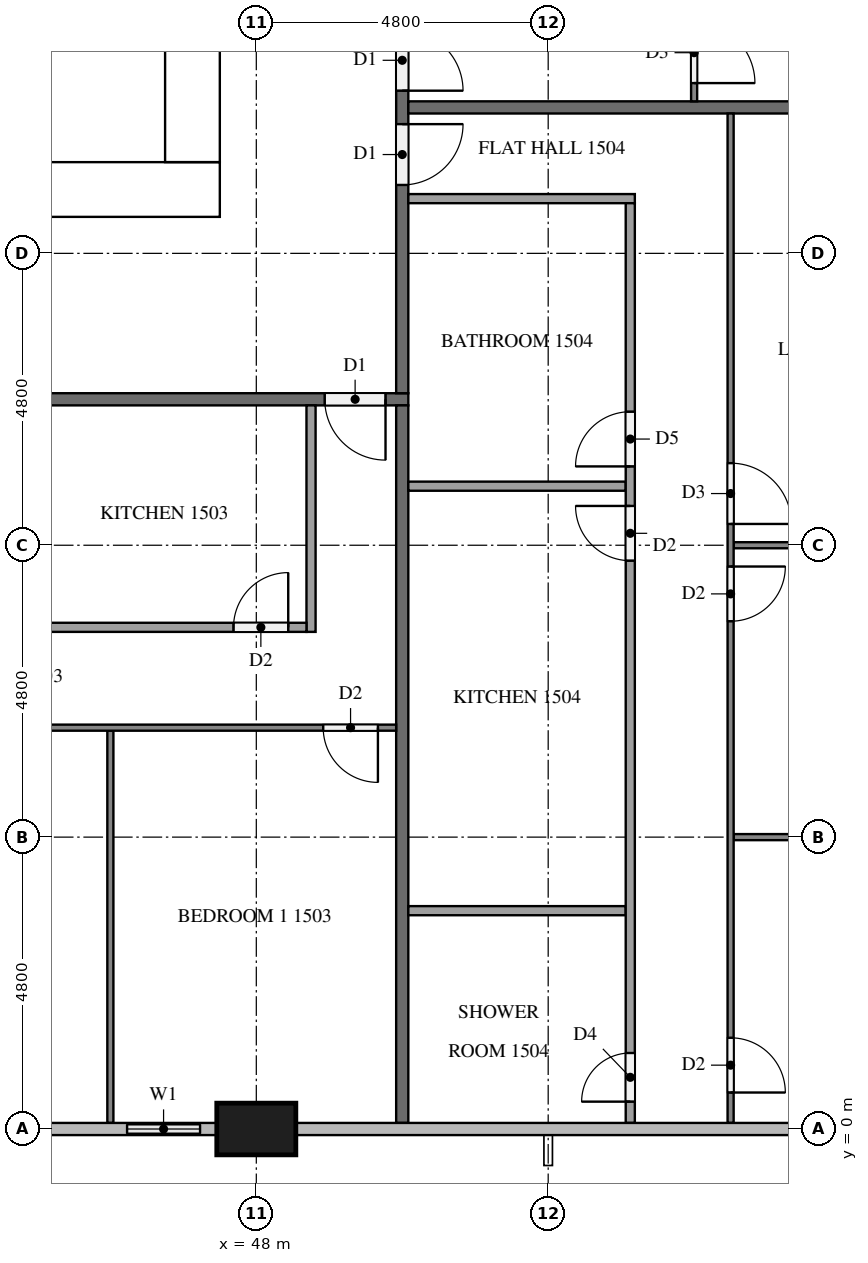
"""IFC4 building model, lengths in metres.
Left out: names, types, materials, properties, quantities, classifications, styles, units other than length and angle.
Written with IfcOpenShell. Run it as: python <this file> out.ifc"""

import sys

from ifc_helpers import new_model, si_unit, direction, frame, frame_2d, origin, origin_2d, place, context, subcontext, project, spatial, rectangle, extrude, element, fill, save


model = new_model("IFC4")
c1 = context("Model", 3, precision=1e-05, world=origin(), true_north=direction((0.0, 1.0)))
c2 = subcontext(c1, "Body", "Model", "MODEL_VIEW")
j1 = project(units=[si_unit("LENGTHUNIT", "METRE"), si_unit("PLANEANGLEUNIT", "RADIAN")], contexts=[c1])
p1 = place(None, origin())
s1 = spatial("IfcSite", under=j1, at=p1, CompositionType="ELEMENT")
p2 = place(p1, origin())
s2 = spatial("IfcBuilding", under=s1, at=p2, CompositionType="ELEMENT")
p3 = place(p2, frame((0.0, 0.0, 62.8)))
s3 = spatial("IfcBuildingStorey", under=s2, at=p3, CompositionType="ELEMENT", Elevation=62.8)
p4 = place(p3, frame((15.0, 15.45, 0.0), z_axis=(0.0, 0.0, 1.0), x_axis=(1.0, 0.0, 0.0)))
e1 = element("IfcWall", 1, at=p4, inside=s3, PredefinedType="SHEAR", context=c2, shape_type="SweptSolid", body=[
    extrude(rectangle(XDim=32.4, YDim=0.9, at=frame_2d((16.2, 0.0))), origin(), (0.0, 0.0, 1.0), 3.2),
])
p5 = place(p4, frame((15.3, 0.0, 0.0)))
e2 = element("IfcOpeningElement", 2, at=p5, cuts=e1, PredefinedType="OPENING", context=c2, shape_type="SweptSolid", body=[
    extrude(rectangle(XDim=1.8, YDim=2.1, at=frame_2d((0.9, 1.05))), frame((0.0, 0.46, 0.0), z_axis=(0.0, -1.0, 0.0), x_axis=(1.0, 0.0, 0.0)), (0.0, 0.0, 1.0), 0.92),
])
p6 = place(p3, frame((46.95, 15.9, 0.0), z_axis=(0.0, 0.0, 1.0), x_axis=(0.0, 1.0, 0.0)))
e3 = element("IfcWall", 3, at=p6, inside=s3, PredefinedType="SHEAR", context=c2, shape_type="SweptSolid", body=[
    extrude(rectangle(XDim=21.0, YDim=0.9, at=frame_2d((10.5, 0.0))), origin(), (0.0, 0.0, 1.0), 3.2),
])
p7 = place(p6, frame((10.2, 0.0, 0.0)))
e4 = element("IfcOpeningElement", 4, at=p7, cuts=e3, PredefinedType="OPENING", context=c2, shape_type="SweptSolid", body=[
    extrude(rectangle(XDim=1.2, YDim=2.1, at=frame_2d((0.6, 1.05))), frame((0.0, 0.46, 0.0), z_axis=(0.0, -1.0, 0.0), x_axis=(1.0, 0.0, 0.0)), (0.0, 0.0, 1.0), 0.92),
])
p8 = place(p3, frame((48.0, 0.0, 0.0), z_axis=(0.0, 0.0, 1.0), x_axis=(1.0, 0.0, 0.0)))
e5 = element("IfcColumn", 5, at=p8, inside=s3, PredefinedType="COLUMN", context=c2, shape_type="SweptSolid", body=[
    extrude(rectangle(XDim=1.3, YDim=0.85, at=origin_2d()), origin(), (0.0, 0.0, 1.0), 3.2),
])
p9 = place(p3, frame((45.6, 0.0, 0.0), z_axis=(0.0, 0.0, 1.0), x_axis=(1.0, 0.0, 0.0)))
e6 = element("IfcWall", 6, at=p9, inside=s3, PredefinedType="SOLIDWALL", context=c2, shape_type="SweptSolid", body=[
    extrude(rectangle(XDim=1.75, YDim=0.15, at=frame_2d((0.875, 0.0))), origin(), (0.0, 0.0, 1.0), 3.2),
])
p10 = place(p9, frame((0.275, 0.0, 0.9)))
e7 = element("IfcOpeningElement", 7, at=p10, cuts=e6, PredefinedType="OPENING", context=c2, shape_type="SweptSolid", body=[
    extrude(rectangle(XDim=1.2, YDim=1.4, at=frame_2d((0.6, 0.7))), frame((0.0, 0.085, 0.0), z_axis=(0.0, -1.0, 0.0), x_axis=(1.0, 0.0, 0.0)), (0.0, 0.0, 1.0), 0.17),
])
p11 = place(p3, frame((50.5, 12.0, 0.0), z_axis=(0.0, 0.0, 1.0), x_axis=(-1.0, 0.0, 0.0)))
e8 = element("IfcWall", 8, at=p11, inside=s3, PredefinedType="PARTITIONING", context=c2, shape_type="SweptSolid", body=[
    extrude(rectangle(XDim=38.6, YDim=0.2, at=frame_2d((19.3, 0.0))), origin(), (0.0, 0.0, 1.0), 3.2),
])
p12 = place(p11, frame((37.225, 0.0, 0.0)))
e9 = element("IfcOpeningElement", 9, at=p12, cuts=e8, PredefinedType="OPENING", context=c2, shape_type="SweptSolid", body=[
    extrude(rectangle(XDim=1.0, YDim=2.1, at=frame_2d((0.5, 1.05))), frame((0.0, 0.11, 0.0), z_axis=(0.0, -1.0, 0.0), x_axis=(1.0, 0.0, 0.0)), (0.0, 0.0, 1.0), 0.22),
])
p13 = place(p11, frame((22.825, 0.0, 0.0)))
e10 = element("IfcOpeningElement", 10, at=p13, cuts=e8, PredefinedType="OPENING", context=c2, shape_type="SweptSolid", body=[
    extrude(rectangle(XDim=1.0, YDim=2.1, at=frame_2d((0.5, 1.05))), frame((0.0, 0.11, 0.0), z_axis=(0.0, -1.0, 0.0), x_axis=(1.0, 0.0, 0.0)), (0.0, 0.0, 1.0), 0.22),
])
p14 = place(p11, frame((0.375, 0.0, 0.0)))
e11 = element("IfcOpeningElement", 11, at=p14, cuts=e8, PredefinedType="OPENING", context=c2, shape_type="SweptSolid", body=[
    extrude(rectangle(XDim=1.0, YDim=2.1, at=frame_2d((0.5, 1.05))), frame((0.0, 0.11, 0.0), z_axis=(0.0, -1.0, 0.0), x_axis=(1.0, 0.0, 0.0)), (0.0, 0.0, 1.0), 0.22),
])
p15 = place(p3, frame((50.4, 40.7, 0.0), z_axis=(0.0, 0.0, 1.0), x_axis=(0.0, -1.0, 0.0)))
e12 = element("IfcWall", 12, at=p15, inside=s3, PredefinedType="PARTITIONING", context=c2, shape_type="SweptSolid", body=[
    extrude(rectangle(XDim=28.6, YDim=0.2, at=frame_2d((14.3, 0.0))), origin(), (0.0, 0.0, 1.0), 3.2),
])
p16 = place(p15, frame((24.175, 0.0, 0.0)))
e13 = element("IfcOpeningElement", 13, at=p16, cuts=e12, PredefinedType="OPENING", context=c2, shape_type="SweptSolid", body=[
    extrude(rectangle(XDim=1.0, YDim=2.1, at=frame_2d((0.5, 1.05))), frame((0.0, 0.11, 0.0), z_axis=(0.0, -1.0, 0.0), x_axis=(1.0, 0.0, 0.0)), (0.0, 0.0, 1.0), 0.22),
])
p17 = place(p15, frame((22.625, 0.0, 0.0)))
e14 = element("IfcOpeningElement", 14, at=p17, cuts=e12, PredefinedType="OPENING", context=c2, shape_type="SweptSolid", body=[
    extrude(rectangle(XDim=1.0, YDim=2.1, at=frame_2d((0.5, 1.05))), frame((0.0, 0.11, 0.0), z_axis=(0.0, -1.0, 0.0), x_axis=(1.0, 0.0, 0.0)), (0.0, 0.0, 1.0), 0.22),
])
p18 = place(p15, frame((10.625, 0.0, 0.0)))
e15 = element("IfcOpeningElement", 15, at=p18, cuts=e12, PredefinedType="OPENING", context=c2, shape_type="SweptSolid", body=[
    extrude(rectangle(XDim=1.0, YDim=2.1, at=frame_2d((0.5, 1.05))), frame((0.0, 0.11, 0.0), z_axis=(0.0, -1.0, 0.0), x_axis=(1.0, 0.0, 0.0)), (0.0, 0.0, 1.0), 0.22),
])
p19 = place(p3, frame((50.4, 11.9, 0.0), z_axis=(0.0, 0.0, 1.0), x_axis=(0.0, -1.0, 0.0)))
e16 = element("IfcWall", 16, at=p19, inside=s3, PredefinedType="PARTITIONING", context=c2, shape_type="SweptSolid", body=[
    extrude(rectangle(XDim=11.8, YDim=0.2, at=frame_2d((5.9, 0.0))), origin(), (0.0, 0.0, 1.0), 3.2),
])
p20 = place(p3, frame((50.5, 16.8, 0.0), z_axis=(0.0, 0.0, 1.0), x_axis=(1.0, 0.0, 0.0)))
e17 = element("IfcWall", 17, at=p20, inside=s3, PredefinedType="PARTITIONING", context=c2, shape_type="SweptSolid", body=[
    extrude(rectangle(XDim=11.8, YDim=0.2, at=frame_2d((5.9, 0.0))), origin(), (0.0, 0.0, 1.0), 3.2),
])
p21 = place(p3, frame((45.6, 6.55, 0.0), z_axis=(0.0, 0.0, 1.0), x_axis=(0.0, -1.0, 0.0)))
e18 = element("IfcWall", 18, at=p21, inside=s3, PredefinedType="PARTITIONING", context=c2, shape_type="SweptSolid", body=[
    extrude(rectangle(XDim=6.45, YDim=0.1, at=frame_2d((3.225, 0.0))), origin(), (0.0, 0.0, 1.0), 3.2),
])
p22 = place(p3, frame((50.3, 6.6, 0.0), z_axis=(0.0, 0.0, 1.0), x_axis=(-1.0, 0.0, 0.0)))
e19 = element("IfcWall", 19, at=p22, inside=s3, PredefinedType="PARTITIONING", context=c2, shape_type="SweptSolid", body=[
    extrude(rectangle(XDim=9.4, YDim=0.1, at=frame_2d((4.7, 0.0))), origin(), (0.0, 0.0, 1.0), 3.2),
])
p23 = place(p22, frame((0.3, 0.0, 0.0)))
e20 = element("IfcOpeningElement", 20, at=p23, cuts=e19, PredefinedType="OPENING", context=c2, shape_type="SweptSolid", body=[
    extrude(rectangle(XDim=0.9, YDim=2.1, at=frame_2d((0.45, 1.05))), frame((0.0, 0.06, 0.0), z_axis=(0.0, -1.0, 0.0), x_axis=(1.0, 0.0, 0.0)), (0.0, 0.0, 1.0), 0.12),
])
p24 = place(p22, frame((8.1, 0.0, 0.0)))
e21 = element("IfcOpeningElement", 21, at=p24, cuts=e19, PredefinedType="OPENING", context=c2, shape_type="SweptSolid", body=[
    extrude(rectangle(XDim=1.0, YDim=2.1, at=frame_2d((0.5, 1.05))), frame((0.0, 0.06, 0.0), z_axis=(0.0, -1.0, 0.0), x_axis=(1.0, 0.0, 0.0)), (0.0, 0.0, 1.0), 0.12),
])
p25 = place(p3, frame((48.9, 11.9, 0.0), z_axis=(0.0, 0.0, 1.0), x_axis=(0.0, -1.0, 0.0)))
e22 = element("IfcWall", 22, at=p25, inside=s3, PredefinedType="PARTITIONING", context=c2, shape_type="SweptSolid", body=[
    extrude(rectangle(XDim=3.725, YDim=0.15, at=frame_2d((1.862, 0.0))), origin(), (0.0, 0.0, 1.0), 3.2),
])
p26 = place(p3, frame((40.9, 8.25, 0.0), z_axis=(0.0, 0.0, 1.0), x_axis=(1.0, 0.0, 0.0)))
e23 = element("IfcWall", 23, at=p26, inside=s3, PredefinedType="PARTITIONING", context=c2, shape_type="SweptSolid", body=[
    extrude(rectangle(XDim=7.925, YDim=0.15, at=frame_2d((3.962, 0.0))), origin(), (0.0, 0.0, 1.0), 3.2),
])
p27 = place(p26, frame((6.725, 0.0, 0.0)))
e24 = element("IfcOpeningElement", 24, at=p27, cuts=e23, PredefinedType="OPENING", context=c2, shape_type="SweptSolid", body=[
    extrude(rectangle(XDim=0.9, YDim=2.1, at=frame_2d((0.45, 1.05))), frame((0.0, 0.085, 0.0), z_axis=(0.0, -1.0, 0.0), x_axis=(1.0, 0.0, 0.0)), (0.0, 0.0, 1.0), 0.17),
])
p28 = place(p26, frame((0.35, 0.0, 0.0)))
e25 = element("IfcOpeningElement", 25, at=p28, cuts=e23, PredefinedType="OPENING", context=c2, shape_type="SweptSolid", body=[
    extrude(rectangle(XDim=0.8, YDim=2.1, at=frame_2d((0.4, 1.05))), frame((0.0, 0.085, 0.0), z_axis=(0.0, -1.0, 0.0), x_axis=(1.0, 0.0, 0.0)), (0.0, 0.0, 1.0), 0.17),
])
p29 = place(p3, frame((55.85, 9.6, 0.0), z_axis=(0.0, 0.0, 1.0), x_axis=(1.0, 0.0, 0.0)))
e26 = element("IfcWall", 26, at=p29, inside=s3, PredefinedType="PARTITIONING", context=c2, shape_type="SweptSolid", body=[
    extrude(rectangle(XDim=6.45, YDim=0.1, at=frame_2d((3.225, 0.0))), origin(), (0.0, 0.0, 1.0), 3.2),
])
p30 = place(p3, frame((55.85, 4.8, 0.0), z_axis=(0.0, 0.0, 1.0), x_axis=(1.0, 0.0, 0.0)))
e27 = element("IfcWall", 27, at=p30, inside=s3, PredefinedType="PARTITIONING", context=c2, shape_type="SweptSolid", body=[
    extrude(rectangle(XDim=5.975, YDim=0.1, at=frame_2d((2.987, 0.0))), origin(), (0.0, 0.0, 1.0), 3.2),
])
p31 = place(p3, frame((55.8, 16.7, 0.0), z_axis=(0.0, 0.0, 1.0), x_axis=(0.0, -1.0, 0.0)))
e28 = element("IfcWall", 28, at=p31, inside=s3, PredefinedType="PARTITIONING", context=c2, shape_type="SweptSolid", body=[
    extrude(rectangle(XDim=16.6, YDim=0.1, at=frame_2d((8.3, 0.0))), origin(), (0.0, 0.0, 1.0), 3.2),
])
p32 = place(p31, frame((5.75, 0.0, 0.0)))
e29 = element("IfcOpeningElement", 29, at=p32, cuts=e28, PredefinedType="OPENING", context=c2, shape_type="SweptSolid", body=[
    extrude(rectangle(XDim=1.0, YDim=2.1, at=frame_2d((0.5, 1.05))), frame((0.0, 0.06, 0.0), z_axis=(0.0, -1.0, 0.0), x_axis=(1.0, 0.0, 0.0)), (0.0, 0.0, 1.0), 0.12),
])
p33 = place(p31, frame((7.45, 0.0, 0.0)))
e30 = element("IfcOpeningElement", 30, at=p33, cuts=e28, PredefinedType="OPENING", context=c2, shape_type="SweptSolid", body=[
    extrude(rectangle(XDim=0.9, YDim=2.1, at=frame_2d((0.45, 1.05))), frame((0.0, 0.06, 0.0), z_axis=(0.0, -1.0, 0.0), x_axis=(1.0, 0.0, 0.0)), (0.0, 0.0, 1.0), 0.12),
])
p34 = place(p31, frame((15.2, 0.0, 0.0)))
e31 = element("IfcOpeningElement", 31, at=p34, cuts=e28, PredefinedType="OPENING", context=c2, shape_type="SweptSolid", body=[
    extrude(rectangle(XDim=0.9, YDim=2.1, at=frame_2d((0.45, 1.05))), frame((0.0, 0.06, 0.0), z_axis=(0.0, -1.0, 0.0), x_axis=(1.0, 0.0, 0.0)), (0.0, 0.0, 1.0), 0.12),
])
for number, where, z_axis, x_axis in (
    (32, (50.5, 10.571, 0.0), (0.0, 0.0, 1.0), (1.0, 0.0, 0.0)),
    (33, (50.5, 3.59, 0.0), (0.0, 0.0, 1.0), (1.0, 0.0, 0.0)),
):
    element("IfcWall", number, at=place(p3, frame(where, z_axis=z_axis, x_axis=x_axis)), inside=s3, PredefinedType="PARTITIONING", context=c2, shape_type="SweptSolid", body=[
        extrude(rectangle(XDim=3.575, YDim=0.15, at=frame_2d((1.788, 0.0))), origin(), (0.0, 0.0, 1.0), 3.2),
    ])
p35 = place(p3, frame((50.5, 15.3, 0.0), z_axis=(0.0, 0.0, 1.0), x_axis=(1.0, 0.0, 0.0)))
e34 = element("IfcWall", 34, at=p35, inside=s3, PredefinedType="PARTITIONING", context=c2, shape_type="SweptSolid", body=[
    extrude(rectangle(XDim=3.725, YDim=0.15, at=frame_2d((1.863, 0.0))), origin(), (0.0, 0.0, 1.0), 3.2),
])
p36 = place(p3, frame((54.15, 0.1, 0.0), z_axis=(0.0, 0.0, 1.0), x_axis=(0.0, 1.0, 0.0)))
e35 = element("IfcWall", 35, at=p36, inside=s3, PredefinedType="PARTITIONING", context=c2, shape_type="SweptSolid", body=[
    extrude(rectangle(XDim=15.125, YDim=0.15, at=frame_2d((7.562, 0.0))), origin(), (0.0, 0.0, 1.0), 3.2),
])
p37 = place(p36, frame((10.796, 0.0, 0.0)))
e36 = element("IfcOpeningElement", 36, at=p37, cuts=e35, PredefinedType="OPENING", context=c2, shape_type="SweptSolid", body=[
    extrude(rectangle(XDim=0.9, YDim=2.1, at=frame_2d((0.45, 1.05))), frame((0.0, 0.085, 0.0), z_axis=(0.0, -1.0, 0.0), x_axis=(1.0, 0.0, 0.0)), (0.0, 0.0, 1.0), 0.17),
])
p38 = place(p36, frame((9.246, 0.0, 0.0)))
e37 = element("IfcOpeningElement", 37, at=p38, cuts=e35, PredefinedType="OPENING", context=c2, shape_type="SweptSolid", body=[
    extrude(rectangle(XDim=0.9, YDim=2.1, at=frame_2d((0.45, 1.05))), frame((0.0, 0.085, 0.0), z_axis=(0.0, -1.0, 0.0), x_axis=(1.0, 0.0, 0.0)), (0.0, 0.0, 1.0), 0.17),
])
p39 = place(p36, frame((0.35, 0.0, 0.0)))
e38 = element("IfcOpeningElement", 38, at=p39, cuts=e35, PredefinedType="OPENING", context=c2, shape_type="SweptSolid", body=[
    extrude(rectangle(XDim=0.8, YDim=2.1, at=frame_2d((0.4, 1.05))), frame((0.0, 0.085, 0.0), z_axis=(0.0, -1.0, 0.0), x_axis=(1.0, 0.0, 0.0)), (0.0, 0.0, 1.0), 0.17),
])
p40 = place(p3, frame((55.2, 28.7, 0.0), z_axis=(0.0, 0.0, 1.0), x_axis=(0.0, -1.0, 0.0)))
e39 = element("IfcWall", 39, at=p40, inside=s3, PredefinedType="PARTITIONING", context=c2, shape_type="SweptSolid", body=[
    extrude(rectangle(XDim=11.8, YDim=0.1, at=frame_2d((5.9, 0.0))), origin(), (0.0, 0.0, 1.0), 3.2),
])
p41 = place(p40, frame((10.5, 0.0, 0.0)))
e40 = element("IfcOpeningElement", 40, at=p41, cuts=e39, PredefinedType="OPENING", context=c2, shape_type="SweptSolid", body=[
    extrude(rectangle(XDim=1.0, YDim=2.1, at=frame_2d((0.5, 1.05))), frame((0.0, 0.06, 0.0), z_axis=(0.0, -1.0, 0.0), x_axis=(1.0, 0.0, 0.0)), (0.0, 0.0, 1.0), 0.12),
])
p42 = place(p40, frame((0.3, 0.0, 0.0)))
e41 = element("IfcOpeningElement", 41, at=p42, cuts=e39, PredefinedType="OPENING", context=c2, shape_type="SweptSolid", body=[
    extrude(rectangle(XDim=0.9, YDim=2.1, at=frame_2d((0.45, 1.05))), frame((0.0, 0.06, 0.0), z_axis=(0.0, -1.0, 0.0), x_axis=(1.0, 0.0, 0.0)), (0.0, 0.0, 1.0), 0.12),
])
p43 = place(p10, origin())
e42 = element("IfcWindow", 42, at=p43, inside=s3, PartitioningType="SINGLE_PANEL", PredefinedType="WINDOW", context=c2, shape_type="SweptSolid", body=[
    extrude(rectangle(XDim=1.2, YDim=1.4, at=frame_2d((0.6, 0.7))), frame((0.0, 0.03, 0.0), z_axis=(0.0, -1.0, 0.0), x_axis=(1.0, 0.0, 0.0)), (0.0, 0.0, 1.0), 0.06),
])
fill(e7, e42)
p44 = place(p14, origin())
e43 = element("IfcDoor", 43, at=p44, inside=s3, OperationType="SINGLE_SWING_LEFT", PredefinedType="DOOR", context=c2, shape_type="SweptSolid", body=[
    extrude(rectangle(XDim=1.0, YDim=2.1, at=frame_2d((0.5, 1.05))), frame((0.0, 0.025, 0.0), z_axis=(0.0, -1.0, 0.0), x_axis=(1.0, 0.0, 0.0)), (0.0, 0.0, 1.0), 0.05),
])
fill(e11, e43)
p45 = place(p16, origin())
e44 = element("IfcDoor", 44, at=p45, inside=s3, OperationType="SINGLE_SWING_LEFT", PredefinedType="DOOR", context=c2, shape_type="SweptSolid", body=[
    extrude(rectangle(XDim=1.0, YDim=2.1, at=frame_2d((0.5, 1.05))), frame((0.0, 0.025, 0.0), z_axis=(0.0, -1.0, 0.0), x_axis=(1.0, 0.0, 0.0)), (0.0, 0.0, 1.0), 0.05),
])
fill(e13, e44)
p46 = place(p17, origin())
e45 = element("IfcDoor", 45, at=p46, inside=s3, OperationType="SINGLE_SWING_RIGHT", PredefinedType="DOOR", context=c2, shape_type="SweptSolid", body=[
    extrude(rectangle(XDim=1.0, YDim=2.1, at=frame_2d((0.5, 1.05))), frame((0.0, 0.025, 0.0), z_axis=(0.0, -1.0, 0.0), x_axis=(1.0, 0.0, 0.0)), (0.0, 0.0, 1.0), 0.05),
])
fill(e14, e45)
p47 = place(p23, origin())
e46 = element("IfcDoor", 46, at=p47, inside=s3, OperationType="SINGLE_SWING_LEFT", PredefinedType="DOOR", context=c2, shape_type="SweptSolid", body=[
    extrude(rectangle(XDim=0.9, YDim=2.1, at=frame_2d((0.45, 1.05))), frame((0.0, 0.025, 0.0), z_axis=(0.0, -1.0, 0.0), x_axis=(1.0, 0.0, 0.0)), (0.0, 0.0, 1.0), 0.05),
])
fill(e20, e46)
p48 = place(p27, origin())
e47 = element("IfcDoor", 47, at=p48, inside=s3, OperationType="SINGLE_SWING_RIGHT", PredefinedType="DOOR", context=c2, shape_type="SweptSolid", body=[
    extrude(rectangle(XDim=0.9, YDim=2.1, at=frame_2d((0.45, 1.05))), frame((0.0, 0.025, 0.0), z_axis=(0.0, -1.0, 0.0), x_axis=(1.0, 0.0, 0.0)), (0.0, 0.0, 1.0), 0.05),
])
fill(e24, e47)
p49 = place(p32, origin())
e48 = element("IfcDoor", 48, at=p49, inside=s3, OperationType="SINGLE_SWING_RIGHT", PredefinedType="DOOR", context=c2, shape_type="SweptSolid", body=[
    extrude(rectangle(XDim=1.0, YDim=2.1, at=frame_2d((0.5, 1.05))), frame((0.0, 0.025, 0.0), z_axis=(0.0, -1.0, 0.0), x_axis=(1.0, 0.0, 0.0)), (0.0, 0.0, 1.0), 0.05),
])
fill(e29, e48)
p50 = place(p33, origin())
e49 = element("IfcDoor", 49, at=p50, inside=s3, OperationType="SINGLE_SWING_LEFT", PredefinedType="DOOR", context=c2, shape_type="SweptSolid", body=[
    extrude(rectangle(XDim=0.9, YDim=2.1, at=frame_2d((0.45, 1.05))), frame((0.0, 0.025, 0.0), z_axis=(0.0, -1.0, 0.0), x_axis=(1.0, 0.0, 0.0)), (0.0, 0.0, 1.0), 0.05),
])
fill(e30, e49)
p51 = place(p34, origin())
e50 = element("IfcDoor", 50, at=p51, inside=s3, OperationType="SINGLE_SWING_RIGHT", PredefinedType="DOOR", context=c2, shape_type="SweptSolid", body=[
    extrude(rectangle(XDim=0.9, YDim=2.1, at=frame_2d((0.45, 1.05))), frame((0.0, 0.025, 0.0), z_axis=(0.0, -1.0, 0.0), x_axis=(1.0, 0.0, 0.0)), (0.0, 0.0, 1.0), 0.05),
])
fill(e31, e50)
p52 = place(p37, origin())
e51 = element("IfcDoor", 51, at=p52, inside=s3, OperationType="SINGLE_SWING_LEFT", PredefinedType="DOOR", context=c2, shape_type="SweptSolid", body=[
    extrude(rectangle(XDim=0.9, YDim=2.1, at=frame_2d((0.45, 1.05))), frame((0.0, 0.025, 0.0), z_axis=(0.0, -1.0, 0.0), x_axis=(1.0, 0.0, 0.0)), (0.0, 0.0, 1.0), 0.05),
])
fill(e36, e51)
p53 = place(p38, origin())
e52 = element("IfcDoor", 52, at=p53, inside=s3, OperationType="SINGLE_SWING_RIGHT", PredefinedType="DOOR", context=c2, shape_type="SweptSolid", body=[
    extrude(rectangle(XDim=0.9, YDim=2.1, at=frame_2d((0.45, 1.05))), frame((0.0, 0.025, 0.0), z_axis=(0.0, -1.0, 0.0), x_axis=(1.0, 0.0, 0.0)), (0.0, 0.0, 1.0), 0.05),
])
fill(e37, e52)
p54 = place(p39, origin())
e53 = element("IfcDoor", 53, at=p54, inside=s3, OperationType="SINGLE_SWING_LEFT", PredefinedType="DOOR", context=c2, shape_type="SweptSolid", body=[
    extrude(rectangle(XDim=0.8, YDim=2.1, at=frame_2d((0.4, 1.05))), frame((0.0, 0.025, 0.0), z_axis=(0.0, -1.0, 0.0), x_axis=(1.0, 0.0, 0.0)), (0.0, 0.0, 1.0), 0.05),
])
fill(e38, e53)
p55 = place(p41, origin())
e54 = element("IfcDoor", 54, at=p55, inside=s3, OperationType="SINGLE_SWING_RIGHT", PredefinedType="DOOR", context=c2, shape_type="SweptSolid", body=[
    extrude(rectangle(XDim=1.0, YDim=2.1, at=frame_2d((0.5, 1.05))), frame((0.0, 0.025, 0.0), z_axis=(0.0, -1.0, 0.0), x_axis=(1.0, 0.0, 0.0)), (0.0, 0.0, 1.0), 0.05),
])
fill(e40, e54)
save(model, sys.argv[1])
